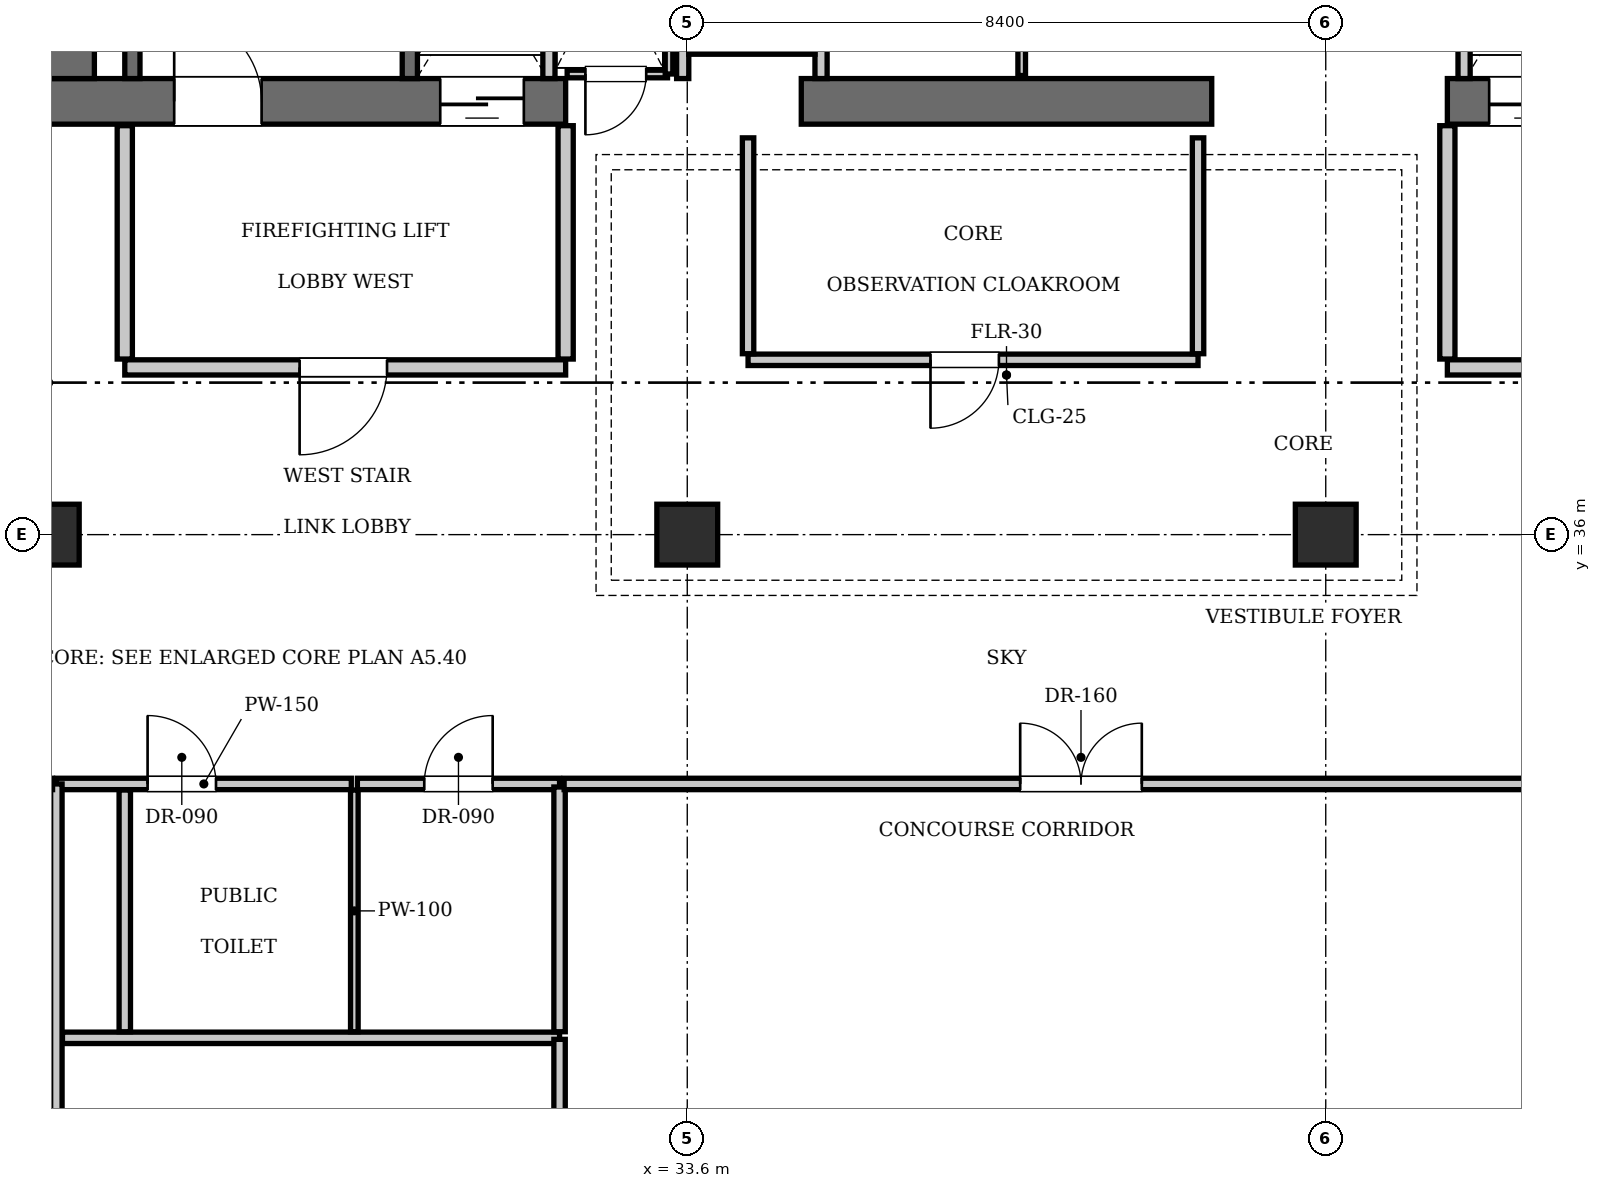
"""IFC4 building model, lengths in metres.
Left out: names, types, materials, properties, quantities, classifications, styles, units other than length and angle.
Written with IfcOpenShell. Run it as: python <this file> out.ifc"""

import sys

from ifc_helpers import new_model, si_unit, direction, frame, frame_2d, origin, origin_2d, place, context, subcontext, project, spatial, rectangle, extrude, element, fill, save


model = new_model("IFC4")
c1 = context("Model", 3, precision=1e-05, world=origin(), true_north=direction((0.0, 1.0)))
c2 = subcontext(c1, "Body", "Model", "MODEL_VIEW")
j1 = project(units=[si_unit("LENGTHUNIT", "METRE"), si_unit("PLANEANGLEUNIT", "RADIAN")], contexts=[c1])
p1 = place(None, origin())
s1 = spatial("IfcSite", under=j1, at=p1, CompositionType="ELEMENT")
p2 = place(p1, origin())
s2 = spatial("IfcBuilding", under=s1, at=p2, CompositionType="ELEMENT")
p3 = place(p2, frame((0.0, 0.0, 354.2)))
s3 = spatial("IfcBuildingStorey", under=s2, at=p3, CompositionType="ELEMENT", Elevation=354.2)
p4 = place(p3, frame((25.2, 41.7, 0.0), z_axis=(0.0, 0.0, 1.0), x_axis=(1.0, 0.0, 0.0)))
e1 = element("IfcWall", 1, at=p4, inside=s3, PredefinedType="SHEAR", context=c2, shape_type="SweptSolid", body=[
    extrude(rectangle(XDim=6.8, YDim=0.6, at=frame_2d((3.4, 0.0))), origin(), (0.0, 0.0, 1.0), 4.9),
])
p5 = place(p4, frame((1.65, 0.0, 0.0)))
e2 = element("IfcOpeningElement", 2, at=p5, cuts=e1, PredefinedType="OPENING", context=c2, shape_type="SweptSolid", body=[
    extrude(rectangle(XDim=1.15, YDim=2.15, at=frame_2d((0.575, 1.075))), frame((0.0, 0.31, 0.0), z_axis=(0.0, -1.0, 0.0), x_axis=(1.0, 0.0, 0.0)), (0.0, 0.0, 1.0), 0.62),
])
p6 = place(p4, frame((5.15, 0.0, 0.0)))
e3 = element("IfcOpeningElement", 3, at=p6, cuts=e1, PredefinedType="OPENING", context=c2, shape_type="SweptSolid", body=[
    extrude(rectangle(XDim=1.1, YDim=2.2, at=frame_2d((0.55, 1.1))), frame((0.0, 0.31, 0.0), z_axis=(0.0, -1.0, 0.0), x_axis=(1.0, 0.0, 0.0)), (0.0, 0.0, 1.0), 0.62),
])
p7 = place(p3, frame((35.1, 41.7, 0.0), z_axis=(0.0, 0.0, 1.0), x_axis=(1.0, 0.0, 0.0)))
e4 = element("IfcWall", 4, at=p7, inside=s3, PredefinedType="SHEAR", context=c2, shape_type="SweptSolid", body=[
    extrude(rectangle(XDim=5.4, YDim=0.6, at=frame_2d((2.7, 0.0))), origin(), (0.0, 0.0, 1.0), 4.9),
])
p8 = place(p3, frame((43.6, 41.7, 0.0), z_axis=(0.0, 0.0, 1.0), x_axis=(1.0, 0.0, 0.0)))
e5 = element("IfcWall", 5, at=p8, inside=s3, PredefinedType="SHEAR", context=c2, shape_type="SweptSolid", body=[
    extrude(rectangle(XDim=6.8, YDim=0.6, at=frame_2d((3.4, 0.0))), origin(), (0.0, 0.0, 1.0), 4.9),
])
p9 = place(p8, frame((3.9, 0.0, 0.0)))
e6 = element("IfcOpeningElement", 6, at=p9, cuts=e5, PredefinedType="OPENING", context=c2, shape_type="SweptSolid", body=[
    extrude(rectangle(XDim=1.15, YDim=2.15, at=frame_2d((0.575, 1.075))), frame((0.0, 0.31, 0.0), z_axis=(0.0, -1.0, 0.0), x_axis=(1.0, 0.0, 0.0)), (0.0, 0.0, 1.0), 0.62),
])
p10 = place(p8, frame((0.55, 0.0, 0.0)))
e7 = element("IfcOpeningElement", 7, at=p10, cuts=e5, PredefinedType="OPENING", context=c2, shape_type="SweptSolid", body=[
    extrude(rectangle(XDim=1.1, YDim=2.2, at=frame_2d((0.55, 1.1))), frame((0.0, 0.31, 0.0), z_axis=(0.0, -1.0, 0.0), x_axis=(1.0, 0.0, 0.0)), (0.0, 0.0, 1.0), 0.62),
])
p11 = place(p3, frame((25.5, 42.0, 0.0), z_axis=(0.0, 0.0, 1.0), x_axis=(0.0, 1.0, 0.0)))
e8 = element("IfcWall", 8, at=p11, inside=s3, PredefinedType="SHEAR", context=c2, shape_type="SweptSolid", body=[
    extrude(rectangle(XDim=2.325, YDim=0.6, at=frame_2d((1.163, 0.0))), origin(), (0.0, 0.0, 1.0), 4.9),
])
for number, where, z_axis, x_axis in (
    (9, (25.2, 36.0, 0.0), (0.0, 0.0, 1.0), (1.0, 0.0, 0.0)),
    (10, (33.6, 36.0, 0.0), (0.0, 0.0, 1.0), (1.0, 0.0, 0.0)),
    (11, (42.0, 36.0, 0.0), (0.0, 0.0, 1.0), (1.0, 0.0, 0.0)),
):
    element("IfcColumn", number, at=place(p3, frame(where, z_axis=z_axis, x_axis=x_axis)), inside=s3, PredefinedType="COLUMN", context=c2, shape_type="SweptSolid", body=[
        extrude(rectangle(XDim=0.8, YDim=0.8, at=origin_2d()), origin(), (0.0, 0.0, 1.0), 4.9),
    ])
p12 = place(p3, frame((29.95, 42.0, 0.0), z_axis=(0.0, 0.0, 1.0), x_axis=(0.0, 1.0, 0.0)))
e12 = element("IfcWall", 12, at=p12, inside=s3, PredefinedType="SOLIDWALL", context=c2, shape_type="SweptSolid", body=[
    extrude(rectangle(XDim=9.15, YDim=0.2, at=frame_2d((4.575, 0.0))), origin(), (0.0, 0.0, 1.0), 4.64),
])
p13 = place(p3, frame((26.3, 42.0, 0.0), z_axis=(0.0, 0.0, 1.0), x_axis=(0.0, 1.0, 0.0)))
e13 = element("IfcWall", 13, at=p13, inside=s3, PredefinedType="SOLIDWALL", context=c2, shape_type="SweptSolid", body=[
    extrude(rectangle(XDim=9.12, YDim=0.2, at=frame_2d((4.56, 0.0))), origin(), (0.0, 0.0, 1.0), 4.64),
])
for number, where, z_axis, x_axis in (
    (14, (31.78, 42.0, 0.0), (0.0, 0.0, 1.0), (0.0, 1.0, 0.0)),
    (15, (43.82, 42.0, 0.0), (0.0, 0.0, 1.0), (0.0, 1.0, 0.0)),
):
    element("IfcWall", number, at=place(p3, frame(where, z_axis=z_axis, x_axis=x_axis)), inside=s3, PredefinedType="SOLIDWALL", context=c2, shape_type="SweptSolid", body=[
        extrude(rectangle(XDim=2.74, YDim=0.16, at=frame_2d((1.37, 0.0))), origin(), (0.0, 0.0, 1.0), 4.64),
    ])
for number, where, z_axis, x_axis in (
    (16, (33.54, 42.0, 0.0), (0.0, 0.0, 1.0), (0.0, 1.0, 0.0)),
    (17, (35.36, 42.0, 0.0), (0.0, 0.0, 1.0), (0.0, 1.0, 0.0)),
):
    element("IfcWall", number, at=place(p3, frame(where, z_axis=z_axis, x_axis=x_axis)), inside=s3, PredefinedType="SOLIDWALL", context=c2, shape_type="SweptSolid", body=[
        extrude(rectangle(XDim=2.4, YDim=0.16, at=frame_2d((1.2, 0.0))), origin(), (0.0, 0.0, 1.0), 4.64),
    ])
p14 = place(p3, frame((33.62, 42.4, 0.0), z_axis=(0.0, 0.0, 1.0), x_axis=(1.0, 0.0, 0.0)))
e18 = element("IfcWall", 18, at=p14, inside=s3, PredefinedType="SOLIDWALL", context=c2, shape_type="SweptSolid", body=[
    extrude(rectangle(XDim=1.66, YDim=0.16, at=frame_2d((0.83, 0.0))), origin(), (0.0, 0.0, 1.0), 4.64),
])
p15 = place(p3, frame((26.2, 38.2, 0.0), z_axis=(0.0, 0.0, 1.0), x_axis=(1.0, 0.0, 0.0)))
e19 = element("IfcWall", 19, at=p15, inside=s3, PredefinedType="PARTITIONING", context=c2, shape_type="SweptSolid", body=[
    extrude(rectangle(XDim=5.8, YDim=0.2, at=frame_2d((2.9, 0.0))), origin(), (0.0, 0.0, 1.0), 4.64),
])
p16 = place(p15, frame((2.3, 0.0, 0.0)))
e20 = element("IfcOpeningElement", 20, at=p16, cuts=e19, PredefinedType="OPENING", context=c2, shape_type="SweptSolid", body=[
    extrude(rectangle(XDim=1.15, YDim=2.15, at=frame_2d((0.575, 1.075))), frame((0.0, 0.11, 0.0), z_axis=(0.0, -1.0, 0.0), x_axis=(1.0, 0.0, 0.0)), (0.0, 0.0, 1.0), 0.22),
])
for number, where, z_axis, x_axis in (
    (21, (26.2, 38.31, 0.0), (0.0, 0.0, 1.0), (0.0, 1.0, 0.0)),
    (22, (32.0, 38.31, 0.0), (0.0, 0.0, 1.0), (0.0, 1.0, 0.0)),
):
    element("IfcWall", number, at=place(p3, frame(where, z_axis=z_axis, x_axis=x_axis)), inside=s3, PredefinedType="PARTITIONING", context=c2, shape_type="SweptSolid", body=[
        extrude(rectangle(XDim=3.07, YDim=0.2, at=frame_2d((1.535, 0.0))), origin(), (0.0, 0.0, 1.0), 4.64),
    ])
p17 = place(p3, frame((43.6, 38.2, 0.0), z_axis=(0.0, 0.0, 1.0), x_axis=(1.0, 0.0, 0.0)))
e23 = element("IfcWall", 23, at=p17, inside=s3, PredefinedType="PARTITIONING", context=c2, shape_type="SweptSolid", body=[
    extrude(rectangle(XDim=5.8, YDim=0.2, at=frame_2d((2.9, 0.0))), origin(), (0.0, 0.0, 1.0), 4.64),
])
p18 = place(p17, frame((2.3, 0.0, 0.0)))
e24 = element("IfcOpeningElement", 24, at=p18, cuts=e23, PredefinedType="OPENING", context=c2, shape_type="SweptSolid", body=[
    extrude(rectangle(XDim=1.15, YDim=2.15, at=frame_2d((0.575, 1.075))), frame((0.0, 0.11, 0.0), z_axis=(0.0, -1.0, 0.0), x_axis=(1.0, 0.0, 0.0)), (0.0, 0.0, 1.0), 0.22),
])
p19 = place(p3, frame((43.6, 38.31, 0.0), z_axis=(0.0, 0.0, 1.0), x_axis=(0.0, 1.0, 0.0)))
e25 = element("IfcWall", 25, at=p19, inside=s3, PredefinedType="PARTITIONING", context=c2, shape_type="SweptSolid", body=[
    extrude(rectangle(XDim=3.07, YDim=0.2, at=frame_2d((1.535, 0.0))), origin(), (0.0, 0.0, 1.0), 4.64),
])
p20 = place(p3, frame((32.02, 42.06, 0.0), z_axis=(0.0, 0.0, 1.0), x_axis=(1.0, 0.0, 0.0)))
e26 = element("IfcWall", 26, at=p20, inside=s3, PredefinedType="PARTITIONING", context=c2, shape_type="SweptSolid", body=[
    extrude(rectangle(XDim=1.32, YDim=0.1, at=frame_2d((0.66, 0.0))), origin(), (0.0, 0.0, 1.0), 4.64),
])
p21 = place(p20, frame((0.24, 0.0, 0.0)))
e27 = element("IfcOpeningElement", 27, at=p21, cuts=e26, PredefinedType="OPENING", context=c2, shape_type="SweptSolid", body=[
    extrude(rectangle(XDim=0.8, YDim=2.05, at=frame_2d((0.4, 1.025))), frame((0.0, 0.06, 0.0), z_axis=(0.0, -1.0, 0.0), x_axis=(1.0, 0.0, 0.0)), (0.0, 0.0, 1.0), 0.12),
])
p22 = place(p3, frame((33.36, 42.06, 0.0), z_axis=(0.0, 0.0, 1.0), x_axis=(0.0, 1.0, 0.0)))
e28 = element("IfcWall", 28, at=p22, inside=s3, PredefinedType="PARTITIONING", context=c2, shape_type="SweptSolid", body=[
    extrude(rectangle(XDim=2.88, YDim=0.1, at=frame_2d((1.44, 0.0))), origin(), (0.0, 0.0, 1.0), 4.64),
])
p23 = place(p3, frame((38.0, 42.04, 0.0), z_axis=(0.0, 0.0, 1.0), x_axis=(0.0, 1.0, 0.0)))
e29 = element("IfcWall", 29, at=p23, inside=s3, PredefinedType="PARTITIONING", context=c2, shape_type="SweptSolid", body=[
    extrude(rectangle(XDim=2.34, YDim=0.1, at=frame_2d((1.17, 0.0))), origin(), (0.0, 0.0, 1.0), 4.64),
])
p24 = place(p3, frame((34.4, 38.3, 0.0), z_axis=(0.0, 0.0, 1.0), x_axis=(1.0, 0.0, 0.0)))
e30 = element("IfcWall", 30, at=p24, inside=s3, PredefinedType="PARTITIONING", context=c2, shape_type="SweptSolid", body=[
    extrude(rectangle(XDim=5.92, YDim=0.15, at=frame_2d((2.96, 0.0))), origin(), (0.0, 0.0, 1.0), 4.64),
])
p25 = place(p24, frame((2.4, 0.0, 0.0)))
e31 = element("IfcOpeningElement", 31, at=p25, cuts=e30, PredefinedType="OPENING", context=c2, shape_type="SweptSolid", body=[
    extrude(rectangle(XDim=0.9, YDim=2.1, at=frame_2d((0.45, 1.05))), frame((0.0, 0.085, 0.0), z_axis=(0.0, -1.0, 0.0), x_axis=(1.0, 0.0, 0.0)), (0.0, 0.0, 1.0), 0.17),
])
for number, where, z_axis, x_axis in (
    (32, (34.4, 38.38, 0.0), (0.0, 0.0, 1.0), (0.0, 1.0, 0.0)),
    (33, (40.32, 38.38, 0.0), (0.0, 0.0, 1.0), (0.0, 1.0, 0.0)),
):
    element("IfcWall", number, at=place(p3, frame(where, z_axis=z_axis, x_axis=x_axis)), inside=s3, PredefinedType="PARTITIONING", context=c2, shape_type="SweptSolid", body=[
        extrude(rectangle(XDim=2.84, YDim=0.15, at=frame_2d((1.42, 0.0))), origin(), (0.0, 0.0, 1.0), 4.64),
    ])
p26 = place(p3, frame((25.3, 32.72, 0.0), z_axis=(0.0, 0.0, 1.0), x_axis=(1.0, 0.0, 0.0)))
e34 = element("IfcWall", 34, at=p26, inside=s3, PredefinedType="PARTITIONING", context=c2, shape_type="SweptSolid", body=[
    extrude(rectangle(XDim=3.88, YDim=0.15, at=frame_2d((1.94, 0.0))), origin(), (0.0, 0.0, 1.0), 4.64),
])
p27 = place(p26, frame((1.2, 0.0, 0.0)))
e35 = element("IfcOpeningElement", 35, at=p27, cuts=e34, PredefinedType="OPENING", context=c2, shape_type="SweptSolid", body=[
    extrude(rectangle(XDim=0.9, YDim=2.1, at=frame_2d((0.45, 1.05))), frame((0.0, 0.085, 0.0), z_axis=(0.0, -1.0, 0.0), x_axis=(1.0, 0.0, 0.0)), (0.0, 0.0, 1.0), 0.17),
])
p28 = place(p3, frame((29.26, 32.72, 0.0), z_axis=(0.0, 0.0, 1.0), x_axis=(1.0, 0.0, 0.0)))
e36 = element("IfcWall", 36, at=p28, inside=s3, PredefinedType="PARTITIONING", context=c2, shape_type="SweptSolid", body=[
    extrude(rectangle(XDim=2.66, YDim=0.15, at=frame_2d((1.33, 0.0))), origin(), (0.0, 0.0, 1.0), 4.64),
])
p29 = place(p28, frame((0.88, 0.0, 0.0)))
e37 = element("IfcOpeningElement", 37, at=p29, cuts=e36, PredefinedType="OPENING", context=c2, shape_type="SweptSolid", body=[
    extrude(rectangle(XDim=0.9, YDim=2.1, at=frame_2d((0.45, 1.05))), frame((0.0, 0.085, 0.0), z_axis=(0.0, -1.0, 0.0), x_axis=(1.0, 0.0, 0.0)), (0.0, 0.0, 1.0), 0.17),
])
p30 = place(p3, frame((25.38, 29.38, 0.0), z_axis=(0.0, 0.0, 1.0), x_axis=(1.0, 0.0, 0.0)))
e38 = element("IfcWall", 38, at=p30, inside=s3, PredefinedType="PARTITIONING", context=c2, shape_type="SweptSolid", body=[
    extrude(rectangle(XDim=6.54, YDim=0.15, at=frame_2d((3.27, 0.0))), origin(), (0.0, 0.0, 1.0), 4.64),
])
p31 = place(p3, frame((26.2, 29.46, 0.0), z_axis=(0.0, 0.0, 1.0), x_axis=(0.0, 1.0, 0.0)))
e39 = element("IfcWall", 39, at=p31, inside=s3, PredefinedType="PARTITIONING", context=c2, shape_type="SweptSolid", body=[
    extrude(rectangle(XDim=3.18, YDim=0.15, at=frame_2d((1.59, 0.0))), origin(), (0.0, 0.0, 1.0), 4.64),
])
p32 = place(p3, frame((29.22, 29.46, 0.0), z_axis=(0.0, 0.0, 1.0), x_axis=(0.0, 1.0, 0.0)))
e40 = element("IfcWall", 40, at=p32, inside=s3, PredefinedType="PARTITIONING", context=c2, shape_type="SweptSolid", body=[
    extrude(rectangle(XDim=3.18, YDim=0.1, at=frame_2d((1.59, 0.0))), origin(), (0.0, 0.0, 1.0), 4.64),
])
p33 = place(p3, frame((31.92, 29.46, 0.0), z_axis=(0.0, 0.0, 1.0), x_axis=(0.0, 1.0, 0.0)))
e41 = element("IfcWall", 41, at=p33, inside=s3, PredefinedType="PARTITIONING", context=c2, shape_type="SweptSolid", body=[
    extrude(rectangle(XDim=3.22, YDim=0.15, at=frame_2d((1.61, 0.0))), origin(), (0.0, 0.0, 1.0), 4.64),
])
p34 = place(p3, frame((31.98, 32.72, 0.0), z_axis=(0.0, 0.0, 1.0), x_axis=(1.0, 0.0, 0.0)))
e42 = element("IfcWall", 42, at=p34, inside=s3, PredefinedType="PARTITIONING", context=c2, shape_type="SweptSolid", body=[
    extrude(rectangle(XDim=18.27, YDim=0.15, at=frame_2d((9.135, 0.0))), origin(), (0.0, 0.0, 1.0), 4.64),
])
p35 = place(p34, frame((6.0, 0.0, 0.0)))
e43 = element("IfcOpeningElement", 43, at=p35, cuts=e42, PredefinedType="OPENING", context=c2, shape_type="SweptSolid", body=[
    extrude(rectangle(XDim=1.6, YDim=2.3, at=frame_2d((0.8, 1.15))), frame((0.0, 0.085, 0.0), z_axis=(0.0, -1.0, 0.0), x_axis=(1.0, 0.0, 0.0)), (0.0, 0.0, 1.0), 0.17),
])
p36 = place(p3, frame((31.92, 17.28, 0.0), z_axis=(0.0, 0.0, 1.0), x_axis=(0.0, 1.0, 0.0)))
e44 = element("IfcWall", 44, at=p36, inside=s3, PredefinedType="PARTITIONING", context=c2, shape_type="SweptSolid", body=[
    extrude(rectangle(XDim=12.08, YDim=0.15, at=frame_2d((6.04, 0.0))), origin(), (0.0, 0.0, 1.0), 4.64),
])
p37 = place(p36, frame((5.59, 0.0, 0.0)))
e45 = element("IfcOpeningElement", 45, at=p37, cuts=e44, PredefinedType="OPENING", context=c2, shape_type="SweptSolid", body=[
    extrude(rectangle(XDim=0.9, YDim=2.1, at=frame_2d((0.45, 1.05))), frame((0.0, 0.085, 0.0), z_axis=(0.0, -1.0, 0.0), x_axis=(1.0, 0.0, 0.0)), (0.0, 0.0, 1.0), 0.17),
])
p38 = place(p3, frame((25.3, 17.28, 0.0), z_axis=(0.0, 0.0, 1.0), x_axis=(0.0, 1.0, 0.0)))
e46 = element("IfcWall", 46, at=p38, inside=s3, PredefinedType="PARTITIONING", context=c2, shape_type="SweptSolid", body=[
    extrude(rectangle(XDim=15.44, YDim=0.15, at=frame_2d((7.72, 0.0))), origin(), (0.0, 0.0, 1.0), 4.177),
])
p39 = place(p5, origin())
e47 = element("IfcDoor", 47, at=p39, inside=s3, OperationType="SINGLE_SWING_LEFT", PredefinedType="DOOR", context=c2, shape_type="SweptSolid", body=[
    extrude(rectangle(XDim=1.15, YDim=2.15, at=frame_2d((0.575, 1.075))), frame((0.0, 0.025, 0.0), z_axis=(0.0, -1.0, 0.0), x_axis=(1.0, 0.0, 0.0)), (0.0, 0.0, 1.0), 0.05),
])
fill(e2, e47)
p40 = place(p6, frame((1.1, 0.0, 0.0), z_axis=(0.0, 0.0, 1.0), x_axis=(-1.0, 0.0, 0.0)))
e48 = element("IfcDoor", 48, at=p40, inside=s3, OperationType="SLIDING_TO_LEFT", PredefinedType="DOOR", context=c2, shape_type="SweptSolid", body=[
    extrude(rectangle(XDim=1.1, YDim=2.2, at=frame_2d((0.55, 1.1))), frame((0.0, 0.025, 0.0), z_axis=(0.0, -1.0, 0.0), x_axis=(1.0, 0.0, 0.0)), (0.0, 0.0, 1.0), 0.05),
])
fill(e3, e48)
p41 = place(p10, frame((1.1, 0.0, 0.0), z_axis=(0.0, 0.0, 1.0), x_axis=(-1.0, 0.0, 0.0)))
e49 = element("IfcDoor", 49, at=p41, inside=s3, OperationType="SLIDING_TO_LEFT", PredefinedType="DOOR", context=c2, shape_type="SweptSolid", body=[
    extrude(rectangle(XDim=1.1, YDim=2.2, at=frame_2d((0.55, 1.1))), frame((0.0, 0.025, 0.0), z_axis=(0.0, -1.0, 0.0), x_axis=(1.0, 0.0, 0.0)), (0.0, 0.0, 1.0), 0.05),
])
fill(e7, e49)
p42 = place(p16, frame((1.15, 0.0, 0.0), z_axis=(0.0, 0.0, 1.0), x_axis=(-1.0, 0.0, 0.0)))
e50 = element("IfcDoor", 50, at=p42, inside=s3, OperationType="SINGLE_SWING_RIGHT", PredefinedType="DOOR", context=c2, shape_type="SweptSolid", body=[
    extrude(rectangle(XDim=1.15, YDim=2.15, at=frame_2d((0.575, 1.075))), frame((0.0, 0.025, 0.0), z_axis=(0.0, -1.0, 0.0), x_axis=(1.0, 0.0, 0.0)), (0.0, 0.0, 1.0), 0.05),
])
fill(e20, e50)
p43 = place(p21, frame((0.8, 0.0, 0.0), z_axis=(0.0, 0.0, 1.0), x_axis=(-1.0, 0.0, 0.0)))
e51 = element("IfcDoor", 51, at=p43, inside=s3, OperationType="SINGLE_SWING_RIGHT", PredefinedType="DOOR", context=c2, shape_type="SweptSolid", body=[
    extrude(rectangle(XDim=0.8, YDim=2.05, at=frame_2d((0.4, 1.025))), frame((0.0, 0.025, 0.0), z_axis=(0.0, -1.0, 0.0), x_axis=(1.0, 0.0, 0.0)), (0.0, 0.0, 1.0), 0.05),
])
fill(e27, e51)
p44 = place(p25, frame((0.9, 0.0, 0.0), z_axis=(0.0, 0.0, 1.0), x_axis=(-1.0, 0.0, 0.0)))
e52 = element("IfcDoor", 52, at=p44, inside=s3, OperationType="SINGLE_SWING_RIGHT", PredefinedType="DOOR", context=c2, shape_type="SweptSolid", body=[
    extrude(rectangle(XDim=0.9, YDim=2.1, at=frame_2d((0.45, 1.05))), frame((0.0, 0.025, 0.0), z_axis=(0.0, -1.0, 0.0), x_axis=(1.0, 0.0, 0.0)), (0.0, 0.0, 1.0), 0.05),
])
fill(e31, e52)
p45 = place(p27, origin())
e53 = element("IfcDoor", 53, at=p45, inside=s3, OperationType="SINGLE_SWING_LEFT", PredefinedType="DOOR", context=c2, shape_type="SweptSolid", body=[
    extrude(rectangle(XDim=0.9, YDim=2.1, at=frame_2d((0.45, 1.05))), frame((0.0, 0.025, 0.0), z_axis=(0.0, -1.0, 0.0), x_axis=(1.0, 0.0, 0.0)), (0.0, 0.0, 1.0), 0.05),
])
fill(e35, e53)
p46 = place(p29, origin())
e54 = element("IfcDoor", 54, at=p46, inside=s3, OperationType="SINGLE_SWING_RIGHT", PredefinedType="DOOR", context=c2, shape_type="SweptSolid", body=[
    extrude(rectangle(XDim=0.9, YDim=2.1, at=frame_2d((0.45, 1.05))), frame((0.0, 0.025, 0.0), z_axis=(0.0, -1.0, 0.0), x_axis=(1.0, 0.0, 0.0)), (0.0, 0.0, 1.0), 0.05),
])
fill(e37, e54)
p47 = place(p35, origin())
e55 = element("IfcDoor", 55, at=p47, inside=s3, OperationType="DOUBLE_DOOR_SINGLE_SWING", PredefinedType="DOOR", context=c2, shape_type="SweptSolid", body=[
    extrude(rectangle(XDim=1.6, YDim=2.3, at=frame_2d((0.8, 1.15))), frame((0.0, 0.025, 0.0), z_axis=(0.0, -1.0, 0.0), x_axis=(1.0, 0.0, 0.0)), (0.0, 0.0, 1.0), 0.05),
])
fill(e43, e55)
save(model, sys.argv[1])
